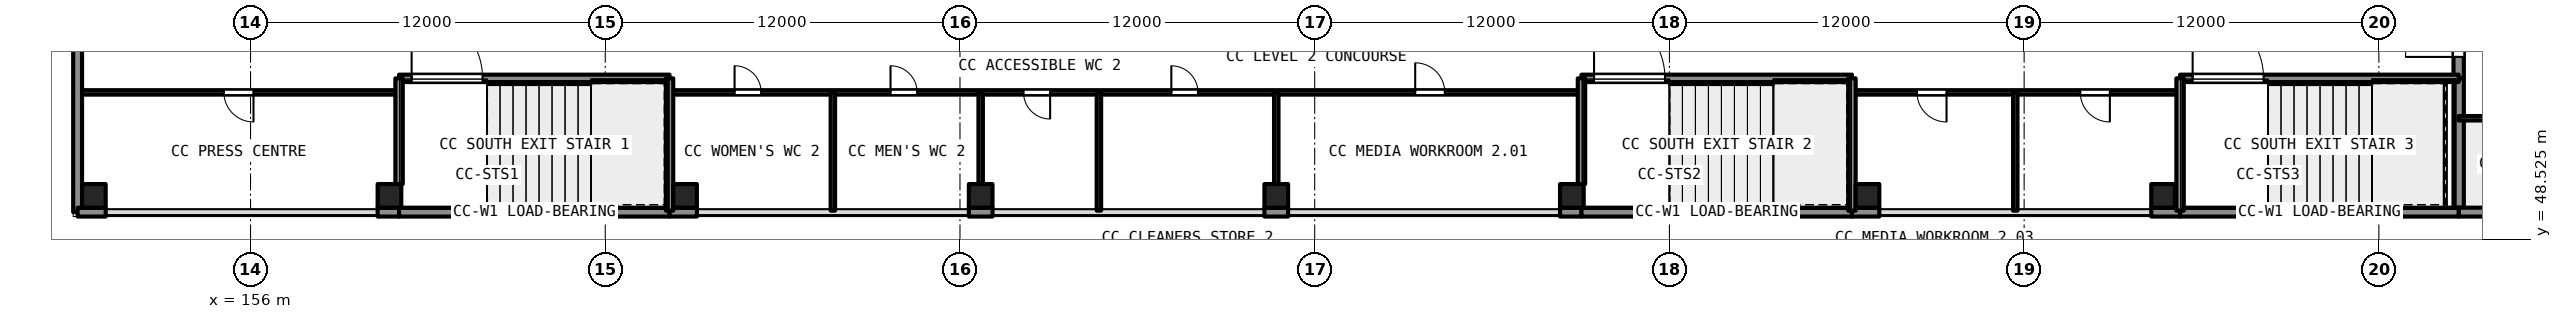
"""IFC4 building model, lengths in metres.
Left out: names, types, materials, properties, quantities, classifications, styles, units other than length and angle.
Written with IfcOpenShell. Run it as: python <this file> out.ifc"""

import sys

from ifc_helpers import new_model, si_unit, direction, frame, frame_2d, origin, origin_2d, place, context, subcontext, project, spatial, rectangle, extrude, element, fill, save


model = new_model("IFC4")
c1 = context("Model", 3, precision=1e-05, world=origin(), true_north=direction((0.0, 1.0)))
c2 = subcontext(c1, "Body", "Model", "MODEL_VIEW")
j1 = project(units=[si_unit("LENGTHUNIT", "METRE"), si_unit("PLANEANGLEUNIT", "RADIAN")], contexts=[c1])
p1 = place(None, origin())
s1 = spatial("IfcSite", under=j1, at=p1, CompositionType="ELEMENT")
p2 = place(p1, origin())
s2 = spatial("IfcBuilding", under=s1, at=p2, CompositionType="ELEMENT")
p3 = place(p2, frame((0.0, 0.0, 15.0)))
s3 = spatial("IfcBuildingStorey", under=s2, at=p3, CompositionType="ELEMENT", Elevation=15.0)
for number, where, z_axis, x_axis in (
    (1, (150.7, 50.0, 0.0), (0.0, 0.0, 1.0), (1.0, 0.0, 0.0)),
    (2, (160.7, 50.0, 0.0), (0.0, 0.0, 1.0), (1.0, 0.0, 0.0)),
    (3, (170.7, 50.0, 0.0), (0.0, 0.0, 1.0), (1.0, 0.0, 0.0)),
    (4, (180.7, 50.0, 0.0), (0.0, 0.0, 1.0), (1.0, 0.0, 0.0)),
    (5, (190.7, 50.0, 0.0), (0.0, 0.0, 1.0), (1.0, 0.0, 0.0)),
    (6, (200.7, 50.0, 0.0), (0.0, 0.0, 1.0), (1.0, 0.0, 0.0)),
    (7, (210.7, 50.0, 0.0), (0.0, 0.0, 1.0), (1.0, 0.0, 0.0)),
    (8, (220.7, 50.0, 0.0), (0.0, 0.0, 1.0), (1.0, 0.0, 0.0)),
):
    element("IfcColumn", number, at=place(p3, frame(where, z_axis=z_axis, x_axis=x_axis)), inside=s3, PredefinedType="COLUMN", context=c2, shape_type="SweptSolid", body=[
        extrude(rectangle(XDim=0.8, YDim=0.8, at=origin_2d()), origin(), (0.0, 0.0, 1.0), 5.4),
    ])
p4 = place(p3, frame((230.7, 49.6, 0.0), z_axis=(0.0, 0.0, 1.0), x_axis=(0.0, 1.0, 0.0)))
e9 = element("IfcWall", 9, at=p4, inside=s3, PredefinedType="SHEAR", context=c2, shape_type="SweptSolid", body=[
    extrude(rectangle(XDim=4.375, YDim=0.35, at=frame_2d((2.188, 0.0))), origin(), (0.0, 0.0, 1.0), 4.99),
])
p5 = place(p3, frame((230.7, 53.975, 0.0), z_axis=(0.0, 0.0, 1.0), x_axis=(0.0, 1.0, 0.0)))
e10 = element("IfcWall", 10, at=p5, inside=s3, PredefinedType="SHEAR", context=c2, shape_type="SweptSolid", body=[
    extrude(rectangle(XDim=2.875, YDim=0.35, at=frame_2d((1.438, 0.0))), origin(), (0.0, 0.0, 1.0), 4.99),
])
p6 = place(p5, frame((0.725, 0.0, 0.0)))
e11 = element("IfcOpeningElement", 11, at=p6, cuts=e10, PredefinedType="OPENING", context=c2, shape_type="SweptSolid", body=[
    extrude(rectangle(XDim=1.8, YDim=2.1, at=frame_2d((0.9, 1.05))), frame((0.0, 0.186, 0.0), z_axis=(0.0, -1.0, 0.0), x_axis=(1.0, 0.0, 0.0)), (0.0, 0.0, 1.0), 0.371),
])
p7 = place(p3, frame((230.7, 49.45, 0.0), z_axis=(0.0, 0.0, 1.0), x_axis=(1.0, 0.0, 0.0)))
e12 = element("IfcWall", 12, at=p7, inside=s3, PredefinedType="SOLIDWALL", context=c2, shape_type="SweptSolid", body=[
    extrude(rectangle(XDim=6.825, YDim=0.3, at=frame_2d((3.413, 0.0))), origin(), (0.0, 0.0, 1.0), 4.99),
])
p8 = place(p3, frame((237.525, 52.625, 0.0), z_axis=(0.0, 0.0, 1.0), x_axis=(-1.0, 0.0, 0.0)))
e13 = element("IfcWall", 13, at=p8, inside=s3, PredefinedType="PARTITIONING", context=c2, shape_type="SweptSolid", body=[
    extrude(rectangle(XDim=6.825, YDim=0.15, at=frame_2d((3.413, 0.0))), origin(), (0.0, 0.0, 1.0), 4.99),
])
p9 = place(p8, frame((2.975, 0.0, 0.0)))
e14 = element("IfcOpeningElement", 14, at=p9, cuts=e13, PredefinedType="OPENING", context=c2, shape_type="SweptSolid", body=[
    extrude(rectangle(XDim=0.9, YDim=2.1, at=frame_2d((0.45, 1.05))), frame((0.0, 0.085, 0.0), z_axis=(0.0, -1.0, 0.0), x_axis=(1.0, 0.0, 0.0)), (0.0, 0.0, 1.0), 0.171),
])
p10 = place(p3, frame((150.15, 49.45, 0.0), z_axis=(0.0, 0.0, 1.0), x_axis=(0.0, 1.0, 0.0)))
e15 = element("IfcWall", 15, at=p10, inside=s3, PredefinedType="SOLIDWALL", context=c2, shape_type="SweptSolid", body=[
    extrude(rectangle(XDim=50.55, YDim=0.3, at=frame_2d((25.275, 0.0))), origin(), (0.0, 0.0, 1.0), 4.99),
])
p11 = place(p10, frame((14.25, 0.0, 0.9)))
e16 = element("IfcOpeningElement", 16, at=p11, cuts=e15, PredefinedType="OPENING", context=c2, shape_type="SweptSolid", body=[
    extrude(rectangle(XDim=2.4, YDim=1.8, at=frame_2d((1.2, 0.9))), frame((0.0, 0.161, 0.0), z_axis=(0.0, -1.0, 0.0), x_axis=(1.0, 0.0, 0.0)), (0.0, 0.0, 1.0), 0.321),
])
p12 = place(p10, frame((24.25, 0.0, 0.9)))
e17 = element("IfcOpeningElement", 17, at=p12, cuts=e15, PredefinedType="OPENING", context=c2, shape_type="SweptSolid", body=[
    extrude(rectangle(XDim=2.4, YDim=1.8, at=frame_2d((1.2, 0.9))), frame((0.0, 0.161, 0.0), z_axis=(0.0, -1.0, 0.0), x_axis=(1.0, 0.0, 0.0)), (0.0, 0.0, 1.0), 0.321),
])
p13 = place(p10, frame((34.25, 0.0, 0.9)))
e18 = element("IfcOpeningElement", 18, at=p13, cuts=e15, PredefinedType="OPENING", context=c2, shape_type="SweptSolid", body=[
    extrude(rectangle(XDim=2.4, YDim=1.8, at=frame_2d((1.2, 0.9))), frame((0.0, 0.161, 0.0), z_axis=(0.0, -1.0, 0.0), x_axis=(1.0, 0.0, 0.0)), (0.0, 0.0, 1.0), 0.321),
])
p14 = place(p10, frame((44.25, 0.0, 0.9)))
e19 = element("IfcOpeningElement", 19, at=p14, cuts=e15, PredefinedType="OPENING", context=c2, shape_type="SweptSolid", body=[
    extrude(rectangle(XDim=2.4, YDim=1.8, at=frame_2d((1.2, 0.9))), frame((0.0, 0.161, 0.0), z_axis=(0.0, -1.0, 0.0), x_axis=(1.0, 0.0, 0.0)), (0.0, 0.0, 1.0), 0.321),
])
p15 = place(p3, frame((150.15, 49.45, 0.0), z_axis=(0.0, 0.0, 1.0), x_axis=(1.0, 0.0, 0.0)))
e20 = element("IfcWall", 20, at=p15, inside=s3, PredefinedType="SOLIDWALL", context=c2, shape_type="SweptSolid", body=[
    extrude(rectangle(XDim=0.95, YDim=0.3, at=frame_2d((0.475, 0.0))), origin(), (0.0, 0.0, 1.0), 4.99),
])
p16 = place(p3, frame((160.3, 49.45, 0.0), z_axis=(0.0, 0.0, 1.0), x_axis=(1.0, 0.0, 0.0)))
e21 = element("IfcWall", 21, at=p16, inside=s3, PredefinedType="SOLIDWALL", context=c2, shape_type="SweptSolid", body=[
    extrude(rectangle(XDim=0.725, YDim=0.3, at=frame_2d((0.362, 0.0))), origin(), (0.0, 0.0, 1.0), 4.99),
])
p17 = place(p3, frame((161.025, 49.45, 0.0), z_axis=(0.0, 0.0, 1.0), x_axis=(1.0, 0.0, 0.0)))
e22 = element("IfcWall", 22, at=p17, inside=s3, PredefinedType="SOLIDWALL", context=c2, shape_type="SweptSolid", body=[
    extrude(rectangle(XDim=9.15, YDim=0.3, at=frame_2d((4.575, 0.0))), origin(), (0.0, 0.0, 1.0), 4.99),
])
p18 = place(p3, frame((170.175, 49.45, 0.0), z_axis=(0.0, 0.0, 1.0), x_axis=(1.0, 0.0, 0.0)))
e23 = element("IfcWall", 23, at=p18, inside=s3, PredefinedType="SOLIDWALL", context=c2, shape_type="SweptSolid", body=[
    extrude(rectangle(XDim=0.925, YDim=0.3, at=frame_2d((0.462, 0.0))), origin(), (0.0, 0.0, 1.0), 4.99),
])
for number, where, z_axis, x_axis in (
    (24, (180.3, 49.45, 0.0), (0.0, 0.0, 1.0), (1.0, 0.0, 0.0)),
    (25, (190.3, 49.45, 0.0), (0.0, 0.0, 1.0), (1.0, 0.0, 0.0)),
):
    element("IfcWall", number, at=place(p3, frame(where, z_axis=z_axis, x_axis=x_axis)), inside=s3, PredefinedType="SOLIDWALL", context=c2, shape_type="SweptSolid", body=[
        extrude(rectangle(XDim=0.8, YDim=0.3, at=frame_2d((0.4, 0.0))), origin(), (0.0, 0.0, 1.0), 4.99),
    ])
p19 = place(p3, frame((200.3, 49.45, 0.0), z_axis=(0.0, 0.0, 1.0), x_axis=(1.0, 0.0, 0.0)))
e26 = element("IfcWall", 26, at=p19, inside=s3, PredefinedType="SOLIDWALL", context=c2, shape_type="SweptSolid", body=[
    extrude(rectangle(XDim=0.725, YDim=0.3, at=frame_2d((0.362, 0.0))), origin(), (0.0, 0.0, 1.0), 4.99),
])
p20 = place(p3, frame((201.025, 49.45, 0.0), z_axis=(0.0, 0.0, 1.0), x_axis=(1.0, 0.0, 0.0)))
e27 = element("IfcWall", 27, at=p20, inside=s3, PredefinedType="SOLIDWALL", context=c2, shape_type="SweptSolid", body=[
    extrude(rectangle(XDim=9.15, YDim=0.3, at=frame_2d((4.575, 0.0))), origin(), (0.0, 0.0, 1.0), 4.99),
])
p21 = place(p3, frame((210.175, 49.45, 0.0), z_axis=(0.0, 0.0, 1.0), x_axis=(1.0, 0.0, 0.0)))
e28 = element("IfcWall", 28, at=p21, inside=s3, PredefinedType="SOLIDWALL", context=c2, shape_type="SweptSolid", body=[
    extrude(rectangle(XDim=0.925, YDim=0.3, at=frame_2d((0.462, 0.0))), origin(), (0.0, 0.0, 1.0), 4.99),
])
p22 = place(p3, frame((220.3, 49.45, 0.0), z_axis=(0.0, 0.0, 1.0), x_axis=(1.0, 0.0, 0.0)))
e29 = element("IfcWall", 29, at=p22, inside=s3, PredefinedType="SOLIDWALL", context=c2, shape_type="SweptSolid", body=[
    extrude(rectangle(XDim=0.975, YDim=0.3, at=frame_2d((0.487, 0.0))), origin(), (0.0, 0.0, 1.0), 4.99),
])
p23 = place(p3, frame((221.275, 49.45, 0.0), z_axis=(0.0, 0.0, 1.0), x_axis=(1.0, 0.0, 0.0)))
e30 = element("IfcWall", 30, at=p23, inside=s3, PredefinedType="SOLIDWALL", context=c2, shape_type="SweptSolid", body=[
    extrude(rectangle(XDim=9.425, YDim=0.3, at=frame_2d((4.712, 0.0))), origin(), (0.0, 0.0, 1.0), 4.99),
])
p24 = place(p3, frame((150.3, 53.5, 0.0), z_axis=(0.0, 0.0, 1.0), x_axis=(1.0, 0.0, 0.0)))
e31 = element("IfcWall", 31, at=p24, inside=s3, PredefinedType="PARTITIONING", context=c2, shape_type="SweptSolid", body=[
    extrude(rectangle(XDim=10.725, YDim=0.15, at=frame_2d((5.362, 0.0))), origin(), (0.0, 0.0, 1.0), 4.99),
])
p25 = place(p24, frame((4.8, 0.0, 0.0)))
e32 = element("IfcOpeningElement", 32, at=p25, cuts=e31, PredefinedType="OPENING", context=c2, shape_type="SweptSolid", body=[
    extrude(rectangle(XDim=1.0, YDim=2.1, at=frame_2d((0.5, 1.05))), frame((0.0, 0.085, 0.0), z_axis=(0.0, -1.0, 0.0), x_axis=(1.0, 0.0, 0.0)), (0.0, 0.0, 1.0), 0.171),
])
p26 = place(p3, frame((170.175, 53.5, 0.0), z_axis=(0.0, 0.0, 1.0), x_axis=(1.0, 0.0, 0.0)))
e33 = element("IfcWall", 33, at=p26, inside=s3, PredefinedType="PARTITIONING", context=c2, shape_type="SweptSolid", body=[
    extrude(rectangle(XDim=30.85, YDim=0.15, at=frame_2d((15.425, 0.0))), origin(), (0.0, 0.0, 1.0), 4.99),
])
p27 = place(p26, frame((11.975, 0.0, 0.0)))
e34 = element("IfcOpeningElement", 34, at=p27, cuts=e33, PredefinedType="OPENING", context=c2, shape_type="SweptSolid", body=[
    extrude(rectangle(XDim=0.9, YDim=2.1, at=frame_2d((0.45, 1.05))), frame((0.0, 0.085, 0.0), z_axis=(0.0, -1.0, 0.0), x_axis=(1.0, 0.0, 0.0)), (0.0, 0.0, 1.0), 0.171),
])
p28 = place(p26, frame((16.975, 0.0, 0.0)))
e35 = element("IfcOpeningElement", 35, at=p28, cuts=e33, PredefinedType="OPENING", context=c2, shape_type="SweptSolid", body=[
    extrude(rectangle(XDim=0.9, YDim=2.1, at=frame_2d((0.45, 1.05))), frame((0.0, 0.085, 0.0), z_axis=(0.0, -1.0, 0.0), x_axis=(1.0, 0.0, 0.0)), (0.0, 0.0, 1.0), 0.171),
])
p29 = place(p26, frame((25.225, 0.0, 0.0)))
e36 = element("IfcOpeningElement", 36, at=p29, cuts=e33, PredefinedType="OPENING", context=c2, shape_type="SweptSolid", body=[
    extrude(rectangle(XDim=1.0, YDim=2.1, at=frame_2d((0.5, 1.05))), frame((0.0, 0.085, 0.0), z_axis=(0.0, -1.0, 0.0), x_axis=(1.0, 0.0, 0.0)), (0.0, 0.0, 1.0), 0.171),
])
p30 = place(p26, frame((7.475, 0.0, 0.0)))
e37 = element("IfcOpeningElement", 37, at=p30, cuts=e33, PredefinedType="OPENING", context=c2, shape_type="SweptSolid", body=[
    extrude(rectangle(XDim=0.9, YDim=2.1, at=frame_2d((0.45, 1.05))), frame((0.0, 0.085, 0.0), z_axis=(0.0, -1.0, 0.0), x_axis=(1.0, 0.0, 0.0)), (0.0, 0.0, 1.0), 0.171),
])
p31 = place(p26, frame((2.2, 0.0, 0.0)))
e38 = element("IfcOpeningElement", 38, at=p31, cuts=e33, PredefinedType="OPENING", context=c2, shape_type="SweptSolid", body=[
    extrude(rectangle(XDim=0.9, YDim=2.1, at=frame_2d((0.45, 1.05))), frame((0.0, 0.085, 0.0), z_axis=(0.0, -1.0, 0.0), x_axis=(1.0, 0.0, 0.0)), (0.0, 0.0, 1.0), 0.171),
])
p32 = place(p3, frame((210.175, 53.5, 0.0), z_axis=(0.0, 0.0, 1.0), x_axis=(1.0, 0.0, 0.0)))
e39 = element("IfcWall", 39, at=p32, inside=s3, PredefinedType="PARTITIONING", context=c2, shape_type="SweptSolid", body=[
    extrude(rectangle(XDim=11.1, YDim=0.15, at=frame_2d((5.55, 0.0))), origin(), (0.0, 0.0, 1.0), 4.99),
])
p33 = place(p32, frame((7.725, 0.0, 0.0)))
e40 = element("IfcOpeningElement", 40, at=p33, cuts=e39, PredefinedType="OPENING", context=c2, shape_type="SweptSolid", body=[
    extrude(rectangle(XDim=1.0, YDim=2.1, at=frame_2d((0.5, 1.05))), frame((0.0, 0.085, 0.0), z_axis=(0.0, -1.0, 0.0), x_axis=(1.0, 0.0, 0.0)), (0.0, 0.0, 1.0), 0.171),
])
p34 = place(p32, frame((2.2, 0.0, 0.0)))
e41 = element("IfcOpeningElement", 41, at=p34, cuts=e39, PredefinedType="OPENING", context=c2, shape_type="SweptSolid", body=[
    extrude(rectangle(XDim=1.0, YDim=2.1, at=frame_2d((0.5, 1.05))), frame((0.0, 0.085, 0.0), z_axis=(0.0, -1.0, 0.0), x_axis=(1.0, 0.0, 0.0)), (0.0, 0.0, 1.0), 0.171),
])
p35 = place(p3, frame((161.025, 53.975, 0.0), z_axis=(0.0, 0.0, 1.0), x_axis=(1.0, 0.0, 0.0)))
e42 = element("IfcWall", 42, at=p35, inside=s3, PredefinedType="SHEAR", context=c2, shape_type="SweptSolid", body=[
    extrude(rectangle(XDim=9.15, YDim=0.25, at=frame_2d((4.575, 0.0))), origin(), (0.0, 0.0, 1.0), 4.99),
])
p36 = place(p35, frame((0.425, 0.0, 0.0)))
e43 = element("IfcOpeningElement", 43, at=p36, cuts=e42, PredefinedType="OPENING", context=c2, shape_type="SweptSolid", body=[
    extrude(rectangle(XDim=2.4, YDim=2.1, at=frame_2d((1.2, 1.05))), frame((0.0, 0.135, 0.0), z_axis=(0.0, -1.0, 0.0), x_axis=(1.0, 0.0, 0.0)), (0.0, 0.0, 1.0), 0.271),
])
p37 = place(p3, frame((161.025, 50.4, 0.0), z_axis=(0.0, 0.0, 1.0), x_axis=(0.0, 1.0, 0.0)))
e44 = element("IfcWall", 44, at=p37, inside=s3, PredefinedType="SHEAR", context=c2, shape_type="SweptSolid", body=[
    extrude(rectangle(XDim=3.575, YDim=0.25, at=frame_2d((1.788, 0.0))), origin(), (0.0, 0.0, 1.0), 4.99),
])
p38 = place(p3, frame((170.175, 49.5, 0.0), z_axis=(0.0, 0.0, 1.0), x_axis=(0.0, 1.0, 0.0)))
e45 = element("IfcWall", 45, at=p38, inside=s3, PredefinedType="SHEAR", context=c2, shape_type="SweptSolid", body=[
    extrude(rectangle(XDim=4.475, YDim=0.25, at=frame_2d((2.238, 0.0))), origin(), (0.0, 0.0, 1.0), 4.99),
])
p39 = place(p3, frame((201.025, 53.975, 0.0), z_axis=(0.0, 0.0, 1.0), x_axis=(1.0, 0.0, 0.0)))
e46 = element("IfcWall", 46, at=p39, inside=s3, PredefinedType="SHEAR", context=c2, shape_type="SweptSolid", body=[
    extrude(rectangle(XDim=9.15, YDim=0.25, at=frame_2d((4.575, 0.0))), origin(), (0.0, 0.0, 1.0), 4.99),
])
p40 = place(p39, frame((0.425, 0.0, 0.0)))
e47 = element("IfcOpeningElement", 47, at=p40, cuts=e46, PredefinedType="OPENING", context=c2, shape_type="SweptSolid", body=[
    extrude(rectangle(XDim=2.4, YDim=2.1, at=frame_2d((1.2, 1.05))), frame((0.0, 0.135, 0.0), z_axis=(0.0, -1.0, 0.0), x_axis=(1.0, 0.0, 0.0)), (0.0, 0.0, 1.0), 0.271),
])
p41 = place(p3, frame((201.025, 50.4, 0.0), z_axis=(0.0, 0.0, 1.0), x_axis=(0.0, 1.0, 0.0)))
e48 = element("IfcWall", 48, at=p41, inside=s3, PredefinedType="SHEAR", context=c2, shape_type="SweptSolid", body=[
    extrude(rectangle(XDim=3.575, YDim=0.25, at=frame_2d((1.788, 0.0))), origin(), (0.0, 0.0, 1.0), 4.99),
])
p42 = place(p3, frame((210.175, 49.5, 0.0), z_axis=(0.0, 0.0, 1.0), x_axis=(0.0, 1.0, 0.0)))
e49 = element("IfcWall", 49, at=p42, inside=s3, PredefinedType="SHEAR", context=c2, shape_type="SweptSolid", body=[
    extrude(rectangle(XDim=4.475, YDim=0.25, at=frame_2d((2.238, 0.0))), origin(), (0.0, 0.0, 1.0), 4.99),
])
p43 = place(p3, frame((221.275, 53.975, 0.0), z_axis=(0.0, 0.0, 1.0), x_axis=(1.0, 0.0, 0.0)))
e50 = element("IfcWall", 50, at=p43, inside=s3, PredefinedType="SHEAR", context=c2, shape_type="SweptSolid", body=[
    extrude(rectangle(XDim=9.425, YDim=0.25, at=frame_2d((4.712, 0.0))), origin(), (0.0, 0.0, 1.0), 4.99),
])
p44 = place(p43, frame((0.425, 0.0, 0.0)))
e51 = element("IfcOpeningElement", 51, at=p44, cuts=e50, PredefinedType="OPENING", context=c2, shape_type="SweptSolid", body=[
    extrude(rectangle(XDim=2.4, YDim=2.1, at=frame_2d((1.2, 1.05))), frame((0.0, 0.135, 0.0), z_axis=(0.0, -1.0, 0.0), x_axis=(1.0, 0.0, 0.0)), (0.0, 0.0, 1.0), 0.271),
])
p45 = place(p3, frame((221.275, 49.5, 0.0), z_axis=(0.0, 0.0, 1.0), x_axis=(0.0, 1.0, 0.0)))
e52 = element("IfcWall", 52, at=p45, inside=s3, PredefinedType="SHEAR", context=c2, shape_type="SweptSolid", body=[
    extrude(rectangle(XDim=4.475, YDim=0.25, at=frame_2d((2.238, 0.0))), origin(), (0.0, 0.0, 1.0), 4.99),
])
p46 = place(p3, frame((175.7, 49.5, 0.0), z_axis=(0.0, 0.0, 1.0), x_axis=(0.0, 1.0, 0.0)))
e53 = element("IfcWall", 53, at=p46, inside=s3, PredefinedType="PARTITIONING", context=c2, shape_type="SweptSolid", body=[
    extrude(rectangle(XDim=4.0, YDim=0.15, at=frame_2d((2.0, 0.0))), origin(), (0.0, 0.0, 1.0), 4.99),
])
p47 = place(p3, frame((180.7, 50.4, 0.0), z_axis=(0.0, 0.0, 1.0), x_axis=(0.0, 1.0, 0.0)))
e54 = element("IfcWall", 54, at=p47, inside=s3, PredefinedType="PARTITIONING", context=c2, shape_type="SweptSolid", body=[
    extrude(rectangle(XDim=3.1, YDim=0.15, at=frame_2d((1.55, 0.0))), origin(), (0.0, 0.0, 1.0), 4.99),
])
p48 = place(p3, frame((184.7, 49.5, 0.0), z_axis=(0.0, 0.0, 1.0), x_axis=(0.0, 1.0, 0.0)))
e55 = element("IfcWall", 55, at=p48, inside=s3, PredefinedType="PARTITIONING", context=c2, shape_type="SweptSolid", body=[
    extrude(rectangle(XDim=4.0, YDim=0.15, at=frame_2d((2.0, 0.0))), origin(), (0.0, 0.0, 1.0), 4.99),
])
p49 = place(p3, frame((190.7, 50.4, 0.0), z_axis=(0.0, 0.0, 1.0), x_axis=(0.0, 1.0, 0.0)))
e56 = element("IfcWall", 56, at=p49, inside=s3, PredefinedType="PARTITIONING", context=c2, shape_type="SweptSolid", body=[
    extrude(rectangle(XDim=3.1, YDim=0.15, at=frame_2d((1.55, 0.0))), origin(), (0.0, 0.0, 1.0), 4.99),
])
p50 = place(p3, frame((215.7, 49.5, 0.0), z_axis=(0.0, 0.0, 1.0), x_axis=(0.0, 1.0, 0.0)))
e57 = element("IfcWall", 57, at=p50, inside=s3, PredefinedType="PARTITIONING", context=c2, shape_type="SweptSolid", body=[
    extrude(rectangle(XDim=4.0, YDim=0.15, at=frame_2d((2.0, 0.0))), origin(), (0.0, 0.0, 1.0), 4.99),
])
p51 = place(p27, origin())
e58 = element("IfcDoor", 58, at=p51, inside=s3, OperationType="SINGLE_SWING_RIGHT", PredefinedType="DOOR", context=c2, shape_type="SweptSolid", body=[
    extrude(rectangle(XDim=0.9, YDim=2.1, at=frame_2d((0.45, 1.05))), frame((0.0, 0.025, 0.0), z_axis=(0.0, -1.0, 0.0), x_axis=(1.0, 0.0, 0.0)), (0.0, 0.0, 1.0), 0.05),
])
fill(e34, e58)
p52 = place(p28, origin())
e59 = element("IfcDoor", 59, at=p52, inside=s3, OperationType="SINGLE_SWING_LEFT", PredefinedType="DOOR", context=c2, shape_type="SweptSolid", body=[
    extrude(rectangle(XDim=0.9, YDim=2.1, at=frame_2d((0.45, 1.05))), frame((0.0, 0.025, 0.0), z_axis=(0.0, -1.0, 0.0), x_axis=(1.0, 0.0, 0.0)), (0.0, 0.0, 1.0), 0.05),
])
fill(e35, e59)
p53 = place(p33, origin())
e60 = element("IfcDoor", 60, at=p53, inside=s3, OperationType="SINGLE_SWING_RIGHT", PredefinedType="DOOR", context=c2, shape_type="SweptSolid", body=[
    extrude(rectangle(XDim=1.0, YDim=2.1, at=frame_2d((0.5, 1.05))), frame((0.0, 0.025, 0.0), z_axis=(0.0, -1.0, 0.0), x_axis=(1.0, 0.0, 0.0)), (0.0, 0.0, 1.0), 0.05),
])
fill(e40, e60)
p54 = place(p29, origin())
e61 = element("IfcDoor", 61, at=p54, inside=s3, OperationType="SINGLE_SWING_LEFT", PredefinedType="DOOR", context=c2, shape_type="SweptSolid", body=[
    extrude(rectangle(XDim=1.0, YDim=2.1, at=frame_2d((0.5, 1.05))), frame((0.0, 0.025, 0.0), z_axis=(0.0, -1.0, 0.0), x_axis=(1.0, 0.0, 0.0)), (0.0, 0.0, 1.0), 0.05),
])
fill(e36, e61)
p55 = place(p34, origin())
e62 = element("IfcDoor", 62, at=p55, inside=s3, OperationType="SINGLE_SWING_RIGHT", PredefinedType="DOOR", context=c2, shape_type="SweptSolid", body=[
    extrude(rectangle(XDim=1.0, YDim=2.1, at=frame_2d((0.5, 1.05))), frame((0.0, 0.025, 0.0), z_axis=(0.0, -1.0, 0.0), x_axis=(1.0, 0.0, 0.0)), (0.0, 0.0, 1.0), 0.05),
])
fill(e41, e62)
p56 = place(p30, origin())
e63 = element("IfcDoor", 63, at=p56, inside=s3, OperationType="SINGLE_SWING_LEFT", PredefinedType="DOOR", context=c2, shape_type="SweptSolid", body=[
    extrude(rectangle(XDim=0.9, YDim=2.1, at=frame_2d((0.45, 1.05))), frame((0.0, 0.025, 0.0), z_axis=(0.0, -1.0, 0.0), x_axis=(1.0, 0.0, 0.0)), (0.0, 0.0, 1.0), 0.05),
])
fill(e37, e63)
p57 = place(p25, origin())
e64 = element("IfcDoor", 64, at=p57, inside=s3, OperationType="SINGLE_SWING_RIGHT", PredefinedType="DOOR", context=c2, shape_type="SweptSolid", body=[
    extrude(rectangle(XDim=1.0, YDim=2.1, at=frame_2d((0.5, 1.05))), frame((0.0, 0.025, 0.0), z_axis=(0.0, -1.0, 0.0), x_axis=(1.0, 0.0, 0.0)), (0.0, 0.0, 1.0), 0.05),
])
fill(e32, e64)
p58 = place(p31, origin())
e65 = element("IfcDoor", 65, at=p58, inside=s3, OperationType="SINGLE_SWING_LEFT", PredefinedType="DOOR", context=c2, shape_type="SweptSolid", body=[
    extrude(rectangle(XDim=0.9, YDim=2.1, at=frame_2d((0.45, 1.05))), frame((0.0, 0.025, 0.0), z_axis=(0.0, -1.0, 0.0), x_axis=(1.0, 0.0, 0.0)), (0.0, 0.0, 1.0), 0.05),
])
fill(e38, e65)
p59 = place(p6, origin())
e66 = element("IfcDoor", 66, at=p59, inside=s3, OperationType="DOUBLE_DOOR_SINGLE_SWING", PredefinedType="DOOR", context=c2, shape_type="SweptSolid", body=[
    extrude(rectangle(XDim=1.8, YDim=2.1, at=frame_2d((0.9, 1.05))), frame((0.0, 0.025, 0.0), z_axis=(0.0, -1.0, 0.0), x_axis=(1.0, 0.0, 0.0)), (0.0, 0.0, 1.0), 0.05),
])
fill(e11, e66)
p60 = place(p36, origin())
e67 = element("IfcDoor", 67, at=p60, inside=s3, OperationType="DOUBLE_DOOR_SINGLE_SWING", PredefinedType="DOOR", context=c2, shape_type="SweptSolid", body=[
    extrude(rectangle(XDim=2.4, YDim=2.1, at=frame_2d((1.2, 1.05))), frame((0.0, 0.025, 0.0), z_axis=(0.0, -1.0, 0.0), x_axis=(1.0, 0.0, 0.0)), (0.0, 0.0, 1.0), 0.05),
])
fill(e43, e67)
p61 = place(p40, origin())
e68 = element("IfcDoor", 68, at=p61, inside=s3, OperationType="DOUBLE_DOOR_SINGLE_SWING", PredefinedType="DOOR", context=c2, shape_type="SweptSolid", body=[
    extrude(rectangle(XDim=2.4, YDim=2.1, at=frame_2d((1.2, 1.05))), frame((0.0, 0.025, 0.0), z_axis=(0.0, -1.0, 0.0), x_axis=(1.0, 0.0, 0.0)), (0.0, 0.0, 1.0), 0.05),
])
fill(e47, e68)
p62 = place(p44, origin())
e69 = element("IfcDoor", 69, at=p62, inside=s3, OperationType="DOUBLE_DOOR_SINGLE_SWING", PredefinedType="DOOR", context=c2, shape_type="SweptSolid", body=[
    extrude(rectangle(XDim=2.4, YDim=2.1, at=frame_2d((1.2, 1.05))), frame((0.0, 0.025, 0.0), z_axis=(0.0, -1.0, 0.0), x_axis=(1.0, 0.0, 0.0)), (0.0, 0.0, 1.0), 0.05),
])
fill(e51, e69)
save(model, sys.argv[1])
